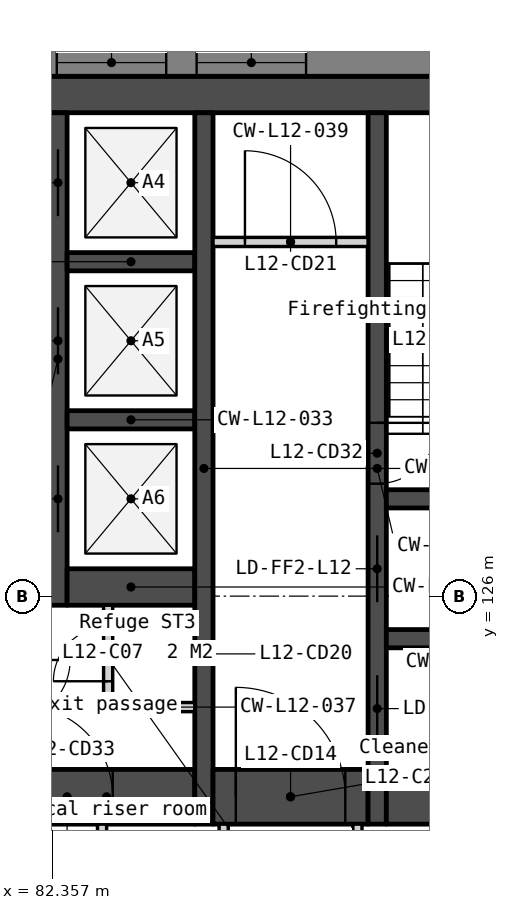
"""IFC4 building model, lengths in metres.
Left out: names, types, materials, properties, quantities, classifications, styles, units other than length and angle.
Written with IfcOpenShell. Run it as: python <this file> out.ifc"""

import sys

from ifc_helpers import new_model, si_unit, direction, frame, frame_2d, origin, place, context, subcontext, project, spatial, polyline, rectangle, outline, extrude, element, fill, save


model = new_model("IFC4")
c1 = context("Model", 3, precision=1e-05, world=origin(), true_north=direction((0.0, 1.0)))
c2 = subcontext(c1, "Body", "Model", "MODEL_VIEW")
j1 = project(units=[si_unit("LENGTHUNIT", "METRE"), si_unit("PLANEANGLEUNIT", "RADIAN")], contexts=[c1])
p1 = place(None, origin())
s1 = spatial("IfcSite", under=j1, at=p1, CompositionType="ELEMENT")
p2 = place(p1, origin())
s2 = spatial("IfcBuilding", under=s1, at=p2, CompositionType="ELEMENT")
p3 = place(p2, frame((0.0, 0.0, 56.0)))
s3 = spatial("IfcBuildingStorey", under=s2, at=p3, CompositionType="ELEMENT", Elevation=56.0)
p4 = place(p3, frame((66.0, 134.25, 0.0), z_axis=(0.0, 0.0, 1.0), x_axis=(1.0, 0.0, 0.0)))
e1 = element("IfcWall", 1, at=p4, inside=s3, PredefinedType="SOLIDWALL", context=c2, shape_type="SweptSolid", body=[
    extrude(rectangle(XDim=28.0, YDim=0.6, at=frame_2d((14.0, 0.0))), origin(), (0.0, 0.0, 1.0), 3.35),
])
p5 = place(p3, frame((81.8, 122.7, 0.0), z_axis=(0.0, 0.0, 1.0), x_axis=(1.0, 0.0, 0.0)))
e2 = element("IfcWall", 2, at=p5, inside=s3, PredefinedType="SOLIDWALL", context=c2, shape_type="SweptSolid", body=[
    extrude(rectangle(XDim=2.9, YDim=0.9, at=frame_2d((1.45, 0.0))), origin(), (0.0, 0.0, 1.0), 3.35),
])
p6 = place(p5, frame((0.05, 0.0, 0.0)))
e3 = element("IfcOpeningElement", 3, at=p6, cuts=e2, PredefinedType="OPENING", context=c2, shape_type="SweptSolid", body=[
    extrude(rectangle(XDim=1.5, YDim=2.1, at=frame_2d((0.75, 1.05))), frame((0.0, 0.46, 0.0), z_axis=(0.0, -1.0, 0.0), x_axis=(1.0, 0.0, 0.0)), (0.0, 0.0, 1.0), 0.92),
])
p7 = place(p3, frame((82.45, 133.95, 0.0), z_axis=(0.0, 0.0, 1.0), x_axis=(0.0, -1.0, 0.0)))
e4 = element("IfcWall", 4, at=p7, inside=s3, PredefinedType="SOLIDWALL", context=c2, shape_type="SweptSolid", body=[
    extrude(rectangle(XDim=8.1, YDim=0.3, at=frame_2d((4.05, 0.0))), origin(), (0.0, 0.0, 1.0), 3.35),
])
p8 = place(p7, frame((0.6, 0.0, 0.0)))
e5 = element("IfcOpeningElement", 5, at=p8, cuts=e4, PredefinedType="OPENING", context=c2, shape_type="SweptSolid", body=[
    extrude(rectangle(XDim=1.1, YDim=2.1, at=frame_2d((0.55, 1.05))), frame((0.0, 0.16, 0.0), z_axis=(0.0, -1.0, 0.0), x_axis=(1.0, 0.0, 0.0)), (0.0, 0.0, 1.0), 0.32),
])
p9 = place(p7, frame((3.2, 0.0, 0.0)))
e6 = element("IfcOpeningElement", 6, at=p9, cuts=e4, PredefinedType="OPENING", context=c2, shape_type="SweptSolid", body=[
    extrude(rectangle(XDim=1.1, YDim=2.1, at=frame_2d((0.55, 1.05))), frame((0.0, 0.16, 0.0), z_axis=(0.0, -1.0, 0.0), x_axis=(1.0, 0.0, 0.0)), (0.0, 0.0, 1.0), 0.32),
])
p10 = place(p7, frame((5.8, 0.0, 0.0)))
e7 = element("IfcOpeningElement", 7, at=p10, cuts=e4, PredefinedType="OPENING", context=c2, shape_type="SweptSolid", body=[
    extrude(rectangle(XDim=1.1, YDim=2.1, at=frame_2d((0.55, 1.05))), frame((0.0, 0.16, 0.0), z_axis=(0.0, -1.0, 0.0), x_axis=(1.0, 0.0, 0.0)), (0.0, 0.0, 1.0), 0.32),
])
for number, where, z_axis, x_axis in (
    (8, (82.6, 131.5, 0.0), (0.0, 0.0, 1.0), (1.0, 0.0, 0.0)),
    (9, (82.6, 128.9, 0.0), (0.0, 0.0, 1.0), (1.0, 0.0, 0.0)),
):
    element("IfcWall", number, at=place(p3, frame(where, z_axis=z_axis, x_axis=x_axis)), inside=s3, PredefinedType="SOLIDWALL", context=c2, shape_type="SweptSolid", body=[
        extrude(rectangle(XDim=2.1, YDim=0.3, at=frame_2d((1.05, 0.0))), origin(), (0.0, 0.0, 1.0), 3.35),
    ])
p11 = place(p3, frame((82.6, 126.15, 0.0), z_axis=(0.0, 0.0, 1.0), x_axis=(1.0, 0.0, 0.0)))
e10 = element("IfcWall", 10, at=p11, inside=s3, PredefinedType="SOLIDWALL", context=c2, shape_type="SweptSolid", body=[
    extrude(rectangle(XDim=2.1, YDim=0.6, at=frame_2d((1.05, 0.0))), origin(), (0.0, 0.0, 1.0), 3.35),
])
p12 = place(p3, frame((83.175, 122.25, 0.0), z_axis=(0.0, 0.0, 1.0), x_axis=(0.0, -1.0, 0.0)))
e11 = element("IfcWall", 11, at=p12, inside=s3, PredefinedType="PARTITIONING", context=c2, shape_type="SweptSolid", body=[
    extrude(rectangle(XDim=2.1, YDim=0.15, at=frame_2d((1.05, 0.0))), origin(), (0.0, 0.0, 1.0), 3.35),
])
p13 = place(p3, frame((83.275, 125.85, 0.0), z_axis=(0.0, 0.0, 1.0), x_axis=(0.0, -1.0, 0.0)))
e12 = element("IfcWall", 12, at=p13, inside=s3, PredefinedType="PARTITIONING", context=c2, shape_type="SweptSolid", body=[
    extrude(rectangle(XDim=1.75, YDim=0.15, at=frame_2d((0.875, 0.0))), origin(), (0.0, 0.0, 1.0), 3.35),
])
p14 = place(p13, frame((0.35, 0.0, 0.0)))
e13 = element("IfcOpeningElement", 13, at=p14, cuts=e12, PredefinedType="OPENING", context=c2, shape_type="SweptSolid", body=[
    extrude(rectangle(XDim=0.9, YDim=2.1, at=frame_2d((0.45, 1.05))), frame((0.0, 0.085, 0.0), z_axis=(0.0, -1.0, 0.0), x_axis=(1.0, 0.0, 0.0)), (0.0, 0.0, 1.0), 0.17),
])
p15 = place(p3, frame((83.35, 124.175, 0.0), z_axis=(0.0, 0.0, 1.0), x_axis=(1.0, 0.0, 0.0)))
e14 = element("IfcWall", 14, at=p15, inside=s3, PredefinedType="PARTITIONING", context=c2, shape_type="SweptSolid", body=[
    extrude(rectangle(XDim=1.35, YDim=0.15, at=frame_2d((0.675, 0.0))), origin(), (0.0, 0.0, 1.0), 3.35),
])
p16 = place(p3, frame((84.85, 133.95, 0.0), z_axis=(0.0, 0.0, 1.0), x_axis=(0.0, -1.0, 0.0)))
e15 = element("IfcWall", 15, at=p16, inside=s3, PredefinedType="SOLIDWALL", context=c2, shape_type="SweptSolid", body=[
    extrude(rectangle(XDim=11.7, YDim=0.3, at=frame_2d((5.85, 0.0))), origin(), (0.0, 0.0, 1.0), 3.35),
])
p17 = place(p3, frame((85.0, 131.825, 0.0), z_axis=(0.0, 0.0, 1.0), x_axis=(1.0, 0.0, 0.0)))
e16 = element("IfcWall", 16, at=p17, inside=s3, PredefinedType="PARTITIONING", context=c2, shape_type="SweptSolid", body=[
    extrude(rectangle(XDim=2.55, YDim=0.15, at=frame_2d((1.275, 0.0))), origin(), (0.0, 0.0, 1.0), 3.35),
])
p18 = place(p17, frame((0.525, 0.0, 0.0)))
e17 = element("IfcOpeningElement", 17, at=p18, cuts=e16, PredefinedType="OPENING", context=c2, shape_type="SweptSolid", body=[
    extrude(rectangle(XDim=1.5, YDim=2.1, at=frame_2d((0.75, 1.05))), frame((0.0, 0.085, 0.0), z_axis=(0.0, -1.0, 0.0), x_axis=(1.0, 0.0, 0.0)), (0.0, 0.0, 1.0), 0.17),
])
p19 = place(p3, frame((85.0, 122.7, 0.0), z_axis=(0.0, 0.0, 1.0), x_axis=(1.0, 0.0, 0.0)))
e18 = element("IfcWall", 18, at=p19, inside=s3, PredefinedType="SOLIDWALL", context=c2, shape_type="SweptSolid", body=[
    extrude(rectangle(XDim=2.55, YDim=0.9, at=frame_2d((1.275, 0.0))), origin(), (0.0, 0.0, 1.0), 3.35),
])
p20 = place(p19, frame((0.375, 0.0, 0.0)))
e19 = element("IfcOpeningElement", 19, at=p20, cuts=e18, PredefinedType="OPENING", context=c2, shape_type="SweptSolid", body=[
    extrude(rectangle(XDim=1.8, YDim=2.1, at=frame_2d((0.9, 1.05))), frame((0.0, 0.46, 0.0), z_axis=(0.0, -1.0, 0.0), x_axis=(1.0, 0.0, 0.0)), (0.0, 0.0, 1.0), 0.92),
])
p21 = place(p3, frame((85.175, 122.25, 0.0), z_axis=(0.0, 0.0, 1.0), x_axis=(0.0, -1.0, 0.0)))
e20 = element("IfcWall", 20, at=p21, inside=s3, PredefinedType="PARTITIONING", context=c2, shape_type="SweptSolid", body=[
    extrude(rectangle(XDim=2.1, YDim=0.15, at=frame_2d((1.05, 0.0))), origin(), (0.0, 0.0, 1.0), 3.35),
])
p22 = place(p21, frame((0.55, 0.0, 0.0)))
e21 = element("IfcOpeningElement", 21, at=p22, cuts=e20, PredefinedType="OPENING", context=c2, shape_type="SweptSolid", body=[
    extrude(rectangle(XDim=1.0, YDim=2.1, at=frame_2d((0.5, 1.05))), frame((0.0, 0.085, 0.0), z_axis=(0.0, -1.0, 0.0), x_axis=(1.0, 0.0, 0.0)), (0.0, 0.0, 1.0), 0.17),
])
p23 = place(p3, frame((87.375, 122.25, 0.0), z_axis=(0.0, 0.0, 1.0), x_axis=(0.0, -1.0, 0.0)))
e22 = element("IfcWall", 22, at=p23, inside=s3, PredefinedType="PARTITIONING", context=c2, shape_type="SweptSolid", body=[
    extrude(rectangle(XDim=2.1, YDim=0.15, at=frame_2d((1.05, 0.0))), origin(), (0.0, 0.0, 1.0), 3.35),
])
p24 = place(p3, frame((87.7, 133.95, 0.0), z_axis=(0.0, 0.0, 1.0), x_axis=(0.0, -1.0, 0.0)))
e23 = element("IfcWall", 23, at=p24, inside=s3, PredefinedType="SOLIDWALL", context=c2, shape_type="SweptSolid", body=[
    extrude(rectangle(XDim=11.7, YDim=0.3, at=frame_2d((5.85, 0.0))), origin(), (0.0, 0.0, 1.0), 3.35),
])
p25 = place(p24, frame((6.95, 0.0, 0.0)))
e24 = element("IfcOpeningElement", 24, at=p25, cuts=e23, PredefinedType="OPENING", context=c2, shape_type="SweptSolid", body=[
    extrude(rectangle(XDim=1.1, YDim=2.1, at=frame_2d((0.55, 1.05))), frame((0.0, 0.16, 0.0), z_axis=(0.0, -1.0, 0.0), x_axis=(1.0, 0.0, 0.0)), (0.0, 0.0, 1.0), 0.32),
])
p26 = place(p24, frame((5.1, 0.0, 0.0)))
e25 = element("IfcOpeningElement", 25, at=p26, cuts=e23, PredefinedType="OPENING", context=c2, shape_type="SweptSolid", body=[
    extrude(rectangle(XDim=1.0, YDim=2.1, at=frame_2d((0.5, 1.05))), frame((0.0, 0.16, 0.0), z_axis=(0.0, -1.0, 0.0), x_axis=(1.0, 0.0, 0.0)), (0.0, 0.0, 1.0), 0.32),
])
p27 = place(p24, frame((9.25, 0.0, 0.0)))
e26 = element("IfcOpeningElement", 26, at=p27, cuts=e23, PredefinedType="OPENING", context=c2, shape_type="SweptSolid", body=[
    extrude(rectangle(XDim=1.1, YDim=2.1, at=frame_2d((0.55, 1.05))), frame((0.0, 0.16, 0.0), z_axis=(0.0, -1.0, 0.0), x_axis=(1.0, 0.0, 0.0)), (0.0, 0.0, 1.0), 0.32),
])
for number, where, z_axis, x_axis in (
    (27, (87.85, 127.6, 0.0), (0.0, 0.0, 1.0), (1.0, 0.0, 0.0)),
    (28, (87.85, 125.3, 0.0), (0.0, 0.0, 1.0), (1.0, 0.0, 0.0)),
):
    element("IfcWall", number, at=place(p3, frame(where, z_axis=z_axis, x_axis=x_axis)), inside=s3, PredefinedType="SOLIDWALL", context=c2, shape_type="SweptSolid", body=[
        extrude(rectangle(XDim=2.55, YDim=0.3, at=frame_2d((1.275, 0.0))), origin(), (0.0, 0.0, 1.0), 3.35),
    ])
p28 = place(p3, frame((87.85, 122.7, 0.0), z_axis=(0.0, 0.0, 1.0), x_axis=(1.0, 0.0, 0.0)))
e29 = element("IfcWall", 29, at=p28, inside=s3, PredefinedType="SOLIDWALL", context=c2, shape_type="SweptSolid", body=[
    extrude(rectangle(XDim=2.55, YDim=0.9, at=frame_2d((1.275, 0.0))), origin(), (0.0, 0.0, 1.0), 3.35),
])
p29 = place(p3, frame((102.4, 134.775, -0.15), z_axis=(0.0, 0.0, 1.0), x_axis=(-1.0, 0.0, 0.0)))
e30 = element("IfcWall", 30, at=p29, inside=s3, PredefinedType="SOLIDWALL", context=c2, shape_type="SweptSolid", body=[
    extrude(outline(polyline([(44.8, 0.0), (44.8, 3.5), (0.0, 3.5), (0.0, 0.0), (44.8, 0.0)])), frame((0.0, 0.225, 0.0), z_axis=(0.0, -1.0, 0.0), x_axis=(1.0, 0.0, 0.0)), (0.0, 0.0, 1.0), 0.45),
])
p30 = place(p29, frame((0.786, 0.0, 1.05)))
e31 = element("IfcOpeningElement", 31, at=p30, cuts=e30, PredefinedType="OPENING", context=c2, shape_type="SweptSolid", body=[
    extrude(rectangle(XDim=1.2, YDim=1.5, at=frame_2d((0.6, 0.75))), frame((0.0, 0.235, 0.0), z_axis=(0.0, -1.0, 0.0), x_axis=(1.0, 0.0, 0.0)), (0.0, 0.0, 1.0), 0.47),
])
p31 = place(p29, frame((6.91, 0.0, 1.05)))
e32 = element("IfcOpeningElement", 32, at=p31, cuts=e30, PredefinedType="OPENING", context=c2, shape_type="SweptSolid", body=[
    extrude(rectangle(XDim=1.8, YDim=1.5, at=frame_2d((0.9, 0.75))), frame((0.0, 0.235, 0.0), z_axis=(0.0, -1.0, 0.0), x_axis=(1.0, 0.0, 0.0)), (0.0, 0.0, 1.0), 0.47),
])
p32 = place(p29, frame((9.21, 0.0, 1.05)))
e33 = element("IfcOpeningElement", 33, at=p32, cuts=e30, PredefinedType="OPENING", context=c2, shape_type="SweptSolid", body=[
    extrude(rectangle(XDim=1.8, YDim=1.5, at=frame_2d((0.9, 0.75))), frame((0.0, 0.235, 0.0), z_axis=(0.0, -1.0, 0.0), x_axis=(1.0, 0.0, 0.0)), (0.0, 0.0, 1.0), 0.47),
])
p33 = place(p29, frame((15.87, 0.0, 1.05)))
e34 = element("IfcOpeningElement", 34, at=p33, cuts=e30, PredefinedType="OPENING", context=c2, shape_type="SweptSolid", body=[
    extrude(rectangle(XDim=1.8, YDim=1.5, at=frame_2d((0.9, 0.75))), frame((0.0, 0.235, 0.0), z_axis=(0.0, -1.0, 0.0), x_axis=(1.0, 0.0, 0.0)), (0.0, 0.0, 1.0), 0.47),
])
p34 = place(p29, frame((18.17, 0.0, 1.05)))
e35 = element("IfcOpeningElement", 35, at=p34, cuts=e30, PredefinedType="OPENING", context=c2, shape_type="SweptSolid", body=[
    extrude(rectangle(XDim=1.8, YDim=1.5, at=frame_2d((0.9, 0.75))), frame((0.0, 0.235, 0.0), z_axis=(0.0, -1.0, 0.0), x_axis=(1.0, 0.0, 0.0)), (0.0, 0.0, 1.0), 0.47),
])
p35 = place(p29, frame((24.83, 0.0, 1.05)))
e36 = element("IfcOpeningElement", 36, at=p35, cuts=e30, PredefinedType="OPENING", context=c2, shape_type="SweptSolid", body=[
    extrude(rectangle(XDim=1.8, YDim=1.5, at=frame_2d((0.9, 0.75))), frame((0.0, 0.235, 0.0), z_axis=(0.0, -1.0, 0.0), x_axis=(1.0, 0.0, 0.0)), (0.0, 0.0, 1.0), 0.47),
])
p36 = place(p29, frame((27.13, 0.0, 1.05)))
e37 = element("IfcOpeningElement", 37, at=p36, cuts=e30, PredefinedType="OPENING", context=c2, shape_type="SweptSolid", body=[
    extrude(rectangle(XDim=1.8, YDim=1.5, at=frame_2d((0.9, 0.75))), frame((0.0, 0.235, 0.0), z_axis=(0.0, -1.0, 0.0), x_axis=(1.0, 0.0, 0.0)), (0.0, 0.0, 1.0), 0.47),
])
p37 = place(p29, frame((33.79, 0.0, 1.05)))
e38 = element("IfcOpeningElement", 38, at=p37, cuts=e30, PredefinedType="OPENING", context=c2, shape_type="SweptSolid", body=[
    extrude(rectangle(XDim=1.8, YDim=1.5, at=frame_2d((0.9, 0.75))), frame((0.0, 0.235, 0.0), z_axis=(0.0, -1.0, 0.0), x_axis=(1.0, 0.0, 0.0)), (0.0, 0.0, 1.0), 0.47),
])
p38 = place(p29, frame((36.09, 0.0, 1.05)))
e39 = element("IfcOpeningElement", 39, at=p38, cuts=e30, PredefinedType="OPENING", context=c2, shape_type="SweptSolid", body=[
    extrude(rectangle(XDim=1.8, YDim=1.5, at=frame_2d((0.9, 0.75))), frame((0.0, 0.235, 0.0), z_axis=(0.0, -1.0, 0.0), x_axis=(1.0, 0.0, 0.0)), (0.0, 0.0, 1.0), 0.47),
])
p39 = place(p29, frame((42.814, 0.0, 1.05)))
e40 = element("IfcOpeningElement", 40, at=p39, cuts=e30, PredefinedType="OPENING", context=c2, shape_type="SweptSolid", body=[
    extrude(rectangle(XDim=1.2, YDim=1.5, at=frame_2d((0.6, 0.75))), frame((0.0, 0.235, 0.0), z_axis=(0.0, -1.0, 0.0), x_axis=(1.0, 0.0, 0.0)), (0.0, 0.0, 1.0), 0.47),
])
p40 = place(p3, frame((83.105, 90.599, -0.15), z_axis=(0.0, 0.0, 1.0), x_axis=(0.499999201451, 0.866025864826, 0.0)))
e41 = element("IfcWall", 41, at=p40, inside=s3, PredefinedType="SOLIDWALL", context=c2, shape_type="SweptSolid", body=[
    extrude(outline(polyline([(44.8, 0.0), (44.8, 3.5), (0.0, 3.5), (0.0, 0.0), (44.8, 0.0)])), frame((0.0, 0.225, 0.0), z_axis=(0.0, -1.0, 0.0), x_axis=(1.0, 0.0, 0.0)), (0.0, 0.0, 1.0), 0.45),
])
p41 = place(p40, frame((0.786, 0.0, 1.05)))
e42 = element("IfcOpeningElement", 42, at=p41, cuts=e41, PredefinedType="OPENING", context=c2, shape_type="SweptSolid", body=[
    extrude(rectangle(XDim=1.2, YDim=1.5, at=frame_2d((0.6, 0.75))), frame((0.0, 0.235, 0.0), z_axis=(0.0, -1.0, 0.0), x_axis=(1.0, 0.0, 0.0)), (0.0, 0.0, 1.0), 0.47),
])
p42 = place(p40, frame((6.91, 0.0, 1.05)))
e43 = element("IfcOpeningElement", 43, at=p42, cuts=e41, PredefinedType="OPENING", context=c2, shape_type="SweptSolid", body=[
    extrude(rectangle(XDim=1.8, YDim=1.5, at=frame_2d((0.9, 0.75))), frame((0.0, 0.235, 0.0), z_axis=(0.0, -1.0, 0.0), x_axis=(1.0, 0.0, 0.0)), (0.0, 0.0, 1.0), 0.47),
])
p43 = place(p40, frame((9.21, 0.0, 1.05)))
e44 = element("IfcOpeningElement", 44, at=p43, cuts=e41, PredefinedType="OPENING", context=c2, shape_type="SweptSolid", body=[
    extrude(rectangle(XDim=1.8, YDim=1.5, at=frame_2d((0.9, 0.75))), frame((0.0, 0.235, 0.0), z_axis=(0.0, -1.0, 0.0), x_axis=(1.0, 0.0, 0.0)), (0.0, 0.0, 1.0), 0.47),
])
p44 = place(p40, frame((15.87, 0.0, 1.05)))
e45 = element("IfcOpeningElement", 45, at=p44, cuts=e41, PredefinedType="OPENING", context=c2, shape_type="SweptSolid", body=[
    extrude(rectangle(XDim=1.8, YDim=1.5, at=frame_2d((0.9, 0.75))), frame((0.0, 0.235, 0.0), z_axis=(0.0, -1.0, 0.0), x_axis=(1.0, 0.0, 0.0)), (0.0, 0.0, 1.0), 0.47),
])
p45 = place(p40, frame((18.17, 0.0, 1.05)))
e46 = element("IfcOpeningElement", 46, at=p45, cuts=e41, PredefinedType="OPENING", context=c2, shape_type="SweptSolid", body=[
    extrude(rectangle(XDim=1.8, YDim=1.5, at=frame_2d((0.9, 0.75))), frame((0.0, 0.235, 0.0), z_axis=(0.0, -1.0, 0.0), x_axis=(1.0, 0.0, 0.0)), (0.0, 0.0, 1.0), 0.47),
])
p46 = place(p40, frame((24.83, 0.0, 1.05)))
e47 = element("IfcOpeningElement", 47, at=p46, cuts=e41, PredefinedType="OPENING", context=c2, shape_type="SweptSolid", body=[
    extrude(rectangle(XDim=1.8, YDim=1.5, at=frame_2d((0.9, 0.75))), frame((0.0, 0.235, 0.0), z_axis=(0.0, -1.0, 0.0), x_axis=(1.0, 0.0, 0.0)), (0.0, 0.0, 1.0), 0.47),
])
p47 = place(p40, frame((27.13, 0.0, 1.05)))
e48 = element("IfcOpeningElement", 48, at=p47, cuts=e41, PredefinedType="OPENING", context=c2, shape_type="SweptSolid", body=[
    extrude(rectangle(XDim=1.8, YDim=1.5, at=frame_2d((0.9, 0.75))), frame((0.0, 0.235, 0.0), z_axis=(0.0, -1.0, 0.0), x_axis=(1.0, 0.0, 0.0)), (0.0, 0.0, 1.0), 0.47),
])
p48 = place(p40, frame((33.79, 0.0, 1.05)))
e49 = element("IfcOpeningElement", 49, at=p48, cuts=e41, PredefinedType="OPENING", context=c2, shape_type="SweptSolid", body=[
    extrude(rectangle(XDim=1.8, YDim=1.5, at=frame_2d((0.9, 0.75))), frame((0.0, 0.235, 0.0), z_axis=(0.0, -1.0, 0.0), x_axis=(1.0, 0.0, 0.0)), (0.0, 0.0, 1.0), 0.47),
])
p49 = place(p40, frame((36.09, 0.0, 1.05)))
e50 = element("IfcOpeningElement", 50, at=p49, cuts=e41, PredefinedType="OPENING", context=c2, shape_type="SweptSolid", body=[
    extrude(rectangle(XDim=1.8, YDim=1.5, at=frame_2d((0.9, 0.75))), frame((0.0, 0.235, 0.0), z_axis=(0.0, -1.0, 0.0), x_axis=(1.0, 0.0, 0.0)), (0.0, 0.0, 1.0), 0.47),
])
p50 = place(p40, frame((42.814, 0.0, 1.05)))
e51 = element("IfcOpeningElement", 51, at=p50, cuts=e41, PredefinedType="OPENING", context=c2, shape_type="SweptSolid", body=[
    extrude(rectangle(XDim=1.2, YDim=1.5, at=frame_2d((0.6, 0.75))), frame((0.0, 0.235, 0.0), z_axis=(0.0, -1.0, 0.0), x_axis=(1.0, 0.0, 0.0)), (0.0, 0.0, 1.0), 0.47),
])
p51 = place(p8, origin())
e52 = element("IfcDoor", 52, at=p51, inside=s3, OperationType="SLIDING_TO_LEFT", PredefinedType="DOOR", context=c2, shape_type="SweptSolid", body=[
    extrude(rectangle(XDim=1.1, YDim=2.1, at=frame_2d((0.55, 1.05))), frame((0.0, 0.025, 0.0), z_axis=(0.0, -1.0, 0.0), x_axis=(1.0, 0.0, 0.0)), (0.0, 0.0, 1.0), 0.05),
])
fill(e5, e52)
p52 = place(p9, origin())
e53 = element("IfcDoor", 53, at=p52, inside=s3, OperationType="SLIDING_TO_LEFT", PredefinedType="DOOR", context=c2, shape_type="SweptSolid", body=[
    extrude(rectangle(XDim=1.1, YDim=2.1, at=frame_2d((0.55, 1.05))), frame((0.0, 0.025, 0.0), z_axis=(0.0, -1.0, 0.0), x_axis=(1.0, 0.0, 0.0)), (0.0, 0.0, 1.0), 0.05),
])
fill(e6, e53)
p53 = place(p10, origin())
e54 = element("IfcDoor", 54, at=p53, inside=s3, OperationType="SLIDING_TO_LEFT", PredefinedType="DOOR", context=c2, shape_type="SweptSolid", body=[
    extrude(rectangle(XDim=1.1, YDim=2.1, at=frame_2d((0.55, 1.05))), frame((0.0, 0.025, 0.0), z_axis=(0.0, -1.0, 0.0), x_axis=(1.0, 0.0, 0.0)), (0.0, 0.0, 1.0), 0.05),
])
fill(e7, e54)
p54 = place(p25, origin())
e55 = element("IfcDoor", 55, at=p54, inside=s3, OperationType="SLIDING_TO_LEFT", PredefinedType="DOOR", context=c2, shape_type="SweptSolid", body=[
    extrude(rectangle(XDim=1.1, YDim=2.1, at=frame_2d((0.55, 1.05))), frame((0.0, 0.025, 0.0), z_axis=(0.0, -1.0, 0.0), x_axis=(1.0, 0.0, 0.0)), (0.0, 0.0, 1.0), 0.05),
])
fill(e24, e55)
p55 = place(p20, origin())
e56 = element("IfcDoor", 56, at=p55, inside=s3, OperationType="DOUBLE_DOOR_DOUBLE_SWING", PredefinedType="DOOR", context=c2, shape_type="SweptSolid", body=[
    extrude(rectangle(XDim=1.8, YDim=2.1, at=frame_2d((0.9, 1.05))), frame((0.0, 0.025, 0.0), z_axis=(0.0, -1.0, 0.0), x_axis=(1.0, 0.0, 0.0)), (0.0, 0.0, 1.0), 0.05),
])
fill(e19, e56)
p56 = place(p6, origin())
e57 = element("IfcDoor", 57, at=p56, inside=s3, OperationType="DOUBLE_DOOR_DOUBLE_SWING", PredefinedType="DOOR", context=c2, shape_type="SweptSolid", body=[
    extrude(rectangle(XDim=1.5, YDim=2.1, at=frame_2d((0.75, 1.05))), frame((0.0, 0.025, 0.0), z_axis=(0.0, -1.0, 0.0), x_axis=(1.0, 0.0, 0.0)), (0.0, 0.0, 1.0), 0.05),
])
fill(e3, e57)
p57 = place(p14, origin())
e58 = element("IfcDoor", 58, at=p57, inside=s3, OperationType="SINGLE_SWING_RIGHT", PredefinedType="DOOR", context=c2, shape_type="SweptSolid", body=[
    extrude(rectangle(XDim=0.9, YDim=2.1, at=frame_2d((0.45, 1.05))), frame((0.0, 0.025, 0.0), z_axis=(0.0, -1.0, 0.0), x_axis=(1.0, 0.0, 0.0)), (0.0, 0.0, 1.0), 0.05),
])
fill(e13, e58)
p58 = place(p18, origin())
e59 = element("IfcDoor", 59, at=p58, inside=s3, OperationType="DOUBLE_DOOR_DOUBLE_SWING", PredefinedType="DOOR", context=c2, shape_type="SweptSolid", body=[
    extrude(rectangle(XDim=1.5, YDim=2.1, at=frame_2d((0.75, 1.05))), frame((0.0, 0.025, 0.0), z_axis=(0.0, -1.0, 0.0), x_axis=(1.0, 0.0, 0.0)), (0.0, 0.0, 1.0), 0.05),
])
fill(e17, e59)
p59 = place(p26, origin())
e60 = element("IfcDoor", 60, at=p59, inside=s3, OperationType="SINGLE_SWING_LEFT", PredefinedType="DOOR", context=c2, shape_type="SweptSolid", body=[
    extrude(rectangle(XDim=1.0, YDim=2.1, at=frame_2d((0.5, 1.05))), frame((0.0, 0.025, 0.0), z_axis=(0.0, -1.0, 0.0), x_axis=(1.0, 0.0, 0.0)), (0.0, 0.0, 1.0), 0.05),
])
fill(e25, e60)
p60 = place(p27, origin())
e61 = element("IfcDoor", 61, at=p60, inside=s3, OperationType="SLIDING_TO_LEFT", PredefinedType="DOOR", context=c2, shape_type="SweptSolid", body=[
    extrude(rectangle(XDim=1.1, YDim=2.1, at=frame_2d((0.55, 1.05))), frame((0.0, 0.025, 0.0), z_axis=(0.0, -1.0, 0.0), x_axis=(1.0, 0.0, 0.0)), (0.0, 0.0, 1.0), 0.05),
])
fill(e26, e61)
p61 = place(p33, origin())
e62 = element("IfcWindow", 62, at=p61, inside=s3, PartitioningType="SINGLE_PANEL", PredefinedType="WINDOW", context=c2, shape_type="SweptSolid", body=[
    extrude(rectangle(XDim=1.8, YDim=1.5, at=frame_2d((0.9, 0.75))), frame((0.0, 0.03, 0.0), z_axis=(0.0, -1.0, 0.0), x_axis=(1.0, 0.0, 0.0)), (0.0, 0.0, 1.0), 0.06),
])
fill(e34, e62)
p62 = place(p34, origin())
e63 = element("IfcWindow", 63, at=p62, inside=s3, PartitioningType="SINGLE_PANEL", PredefinedType="WINDOW", context=c2, shape_type="SweptSolid", body=[
    extrude(rectangle(XDim=1.8, YDim=1.5, at=frame_2d((0.9, 0.75))), frame((0.0, 0.03, 0.0), z_axis=(0.0, -1.0, 0.0), x_axis=(1.0, 0.0, 0.0)), (0.0, 0.0, 1.0), 0.06),
])
fill(e35, e63)
save(model, sys.argv[1])
